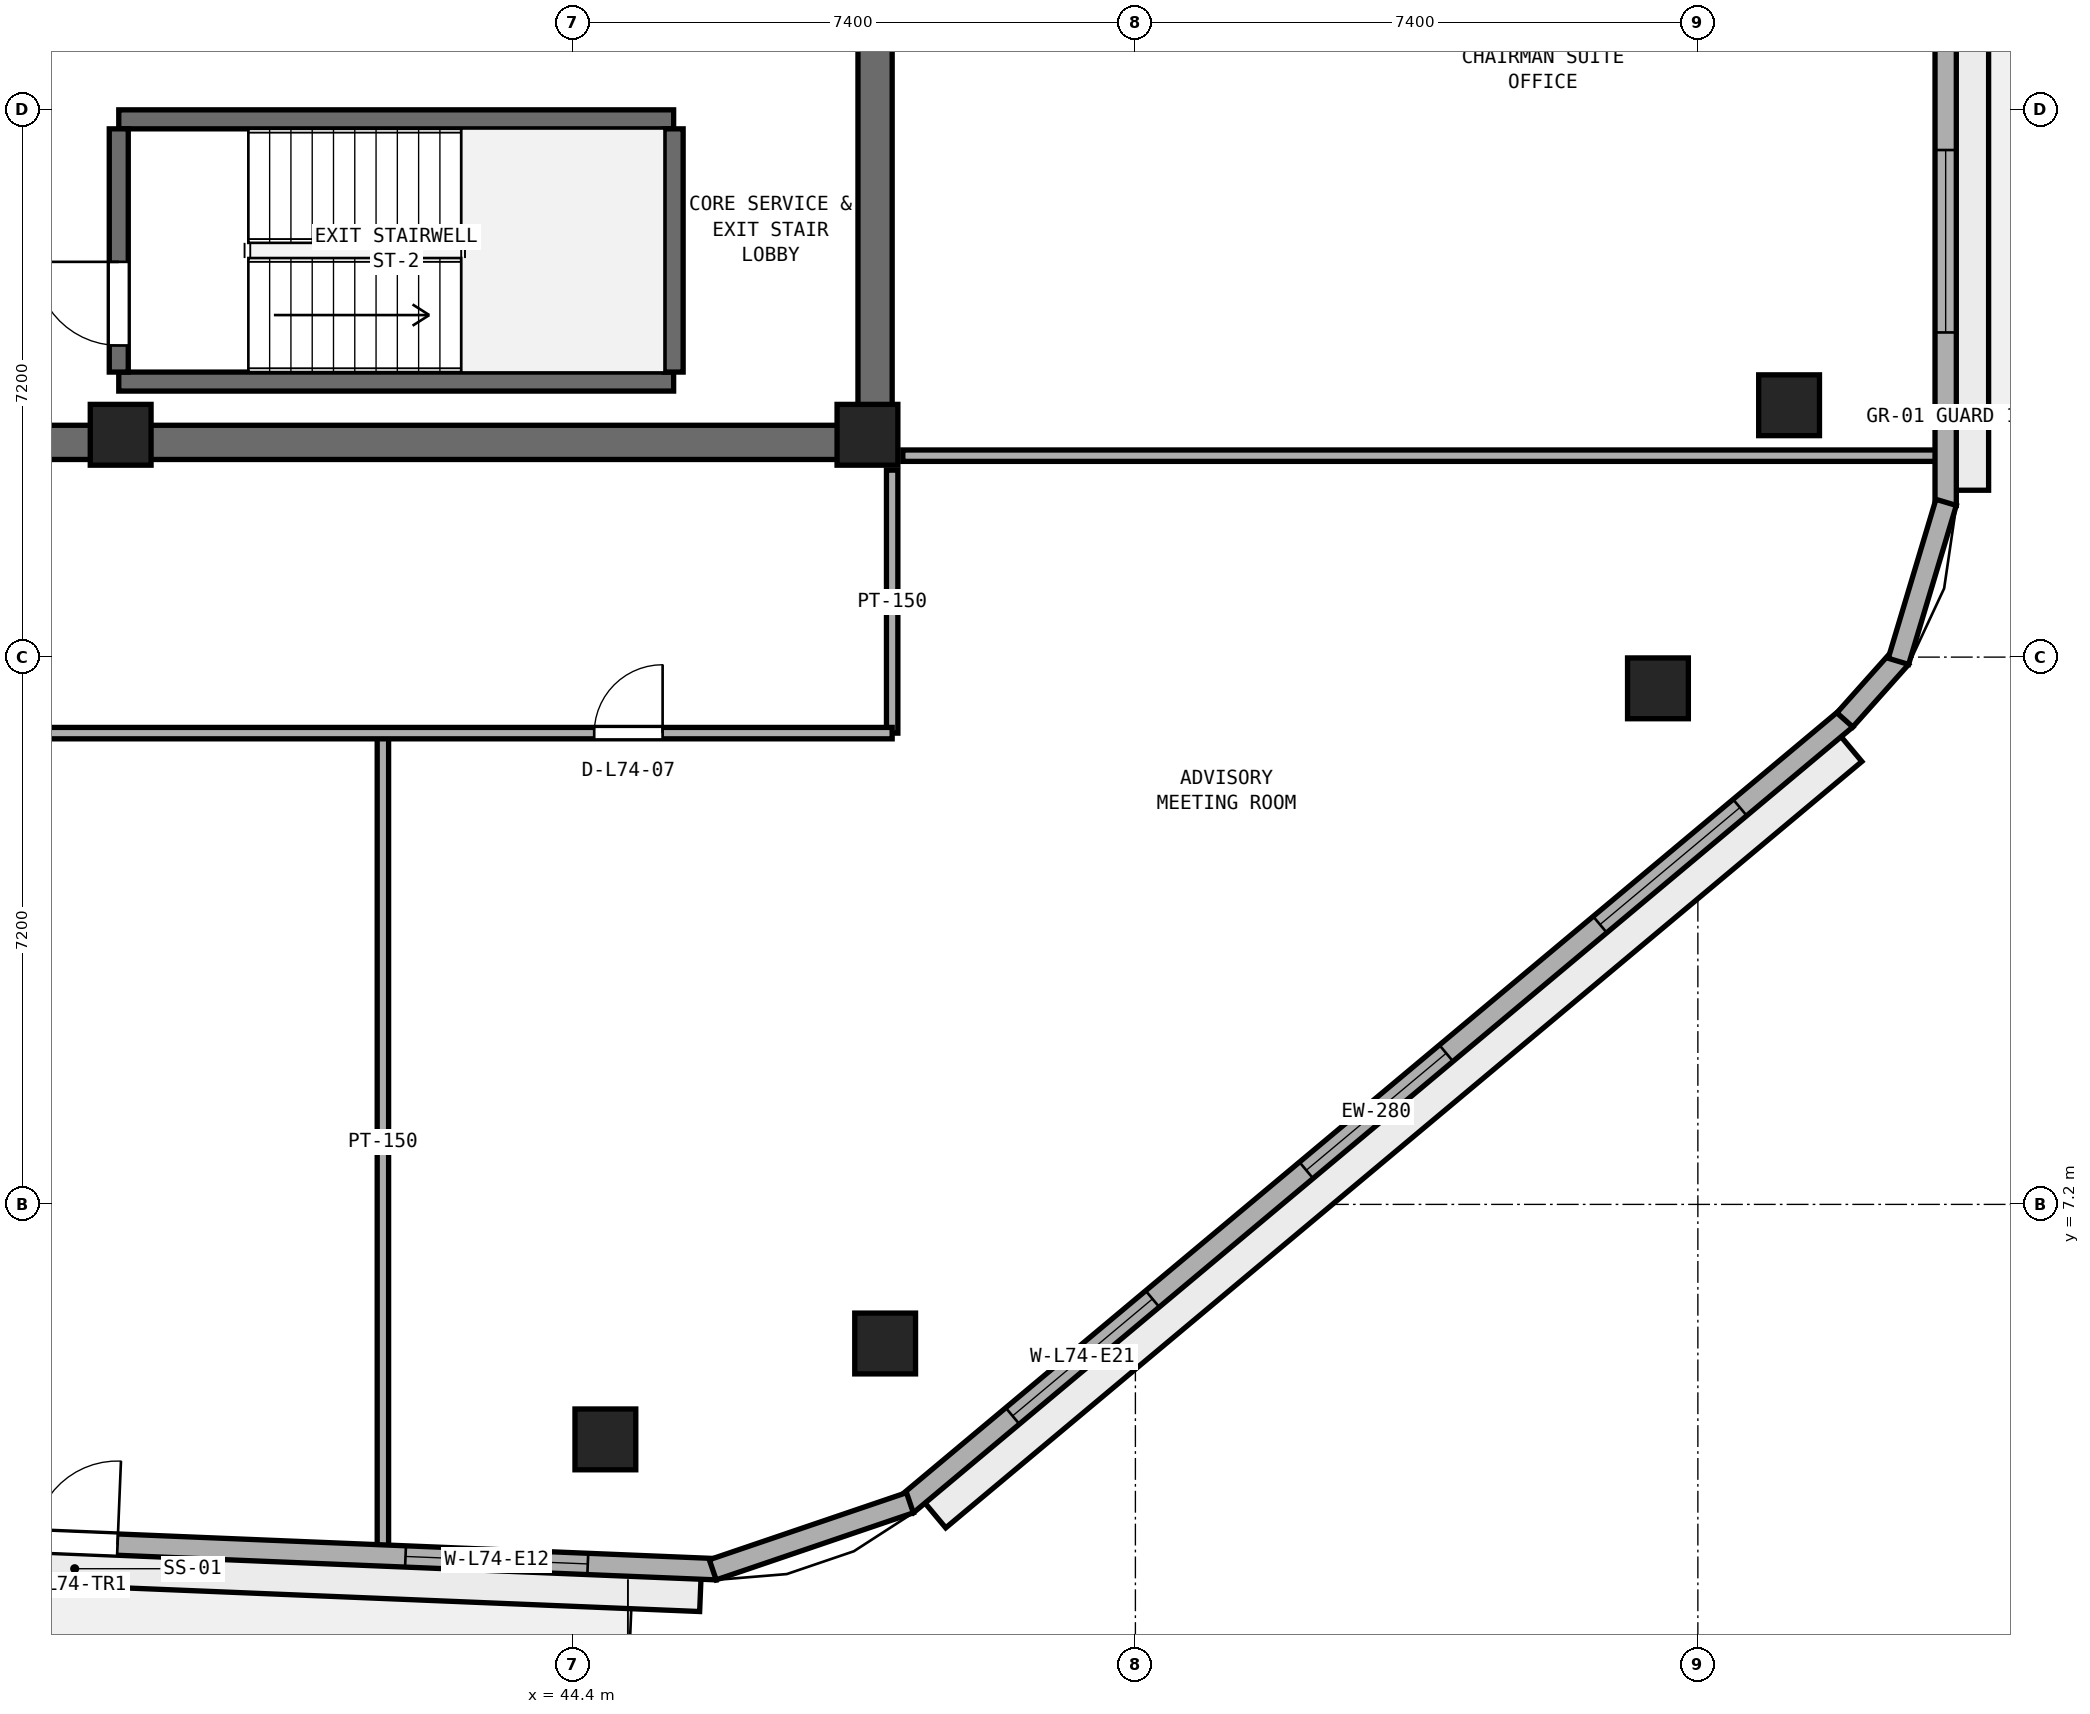
"""IFC4 building model, lengths in metres.
Left out: names, types, materials, properties, quantities, classifications, styles, units other than length and angle.
Written with IfcOpenShell. Run it as: python <this file> out.ifc"""

import sys

from ifc_helpers import new_model, si_unit, direction, frame, frame_2d, origin, origin_2d, place, context, subcontext, project, spatial, rectangle, extrude, element, fill, save


model = new_model("IFC4")
c1 = context("Model", 3, precision=1e-05, world=origin(), true_north=direction((0.0, 1.0)))
c2 = subcontext(c1, "Body", "Model", "MODEL_VIEW")
j1 = project(units=[si_unit("LENGTHUNIT", "METRE"), si_unit("PLANEANGLEUNIT", "RADIAN")], contexts=[c1])
p1 = place(None, origin())
s1 = spatial("IfcSite", under=j1, at=p1, CompositionType="ELEMENT")
p2 = place(p1, origin())
s2 = spatial("IfcBuilding", under=s1, at=p2, CompositionType="ELEMENT")
p3 = place(p2, frame((0.0, 0.0, 289.6)))
s3 = spatial("IfcBuildingStorey", under=s2, at=p3, CompositionType="ELEMENT", Elevation=289.6)
p4 = place(p3, frame((25.4, 17.225, 0.0), z_axis=(0.0, 0.0, 1.0), x_axis=(1.0, 0.0, 0.0)))
e1 = element("IfcWall", 1, at=p4, inside=s3, PredefinedType="SHEAR", context=c2, shape_type="SweptSolid", body=[
    extrude(rectangle(XDim=23.2, YDim=0.45, at=frame_2d((11.6, 0.0))), origin(), (0.0, 0.0, 1.0), 3.54),
])
p5 = place(p3, frame((48.375, 17.45, 0.0), z_axis=(0.0, 0.0, 1.0), x_axis=(0.0, 1.0, 0.0)))
e2 = element("IfcWall", 2, at=p5, inside=s3, PredefinedType="SHEAR", context=c2, shape_type="SweptSolid", body=[
    extrude(rectangle(XDim=15.5, YDim=0.45, at=frame_2d((7.75, 0.0))), origin(), (0.0, 0.0, 1.0), 3.54),
])
p6 = place(p5, frame((5.85, 0.0, 0.0)))
e3 = element("IfcOpeningElement", 3, at=p6, cuts=e2, PredefinedType="OPENING", context=c2, shape_type="SweptSolid", body=[
    extrude(rectangle(XDim=1.5, YDim=2.15, at=frame_2d((0.75, 1.075))), frame((0.0, 0.235, 0.0), z_axis=(0.0, -1.0, 0.0), x_axis=(1.0, 0.0, 0.0)), (0.0, 0.0, 1.0), 0.47),
])
for number, where, z_axis, x_axis in (
    (4, (38.45, 17.325, 0.0), (0.0, 0.0, 1.0), (1.0, 0.0, 0.0)),
    (5, (48.275, 17.325, 0.0), (0.0, 0.0, 1.0), (1.0, 0.0, 0.0)),
):
    element("IfcColumn", number, at=place(p3, frame(where, z_axis=z_axis, x_axis=x_axis)), inside=s3, PredefinedType="PILASTER", context=c2, shape_type="SweptSolid", body=[
        extrude(rectangle(XDim=0.8, YDim=0.8, at=origin_2d()), origin(), (0.0, 0.0, 1.0), 3.8),
    ])
for number, where, z_axis, x_axis in (
    (6, (44.827, 4.108, 0.0), (0.0, 0.0, 1.0), (1.0, 0.0, 0.0)),
    (7, (48.508, 5.37, 0.0), (0.0, 0.0, 1.0), (1.0, 0.0, 0.0)),
    (8, (58.675, 13.989, 0.0), (0.0, 0.0, 1.0), (1.0, 0.0, 0.0)),
    (9, (60.4, 17.714, 0.0), (0.0, 0.0, 1.0), (1.0, 0.0, 0.0)),
):
    element("IfcColumn", number, at=place(p3, frame(where, z_axis=z_axis, x_axis=x_axis)), inside=s3, PredefinedType="COLUMN", context=c2, shape_type="SweptSolid", body=[
        extrude(rectangle(XDim=0.8, YDim=0.8, at=origin_2d()), origin(), (0.0, 0.0, 1.0), 3.8),
    ])
for number, where, z_axis, x_axis in (
    (10, (38.425, 18.025, 0.0), (0.0, 0.0, 1.0), (1.0, 0.0, 0.0)),
    (11, (38.425, 21.475, 0.0), (0.0, 0.0, 1.0), (1.0, 0.0, 0.0)),
):
    element("IfcWall", number, at=place(p3, frame(where, z_axis=z_axis, x_axis=x_axis)), inside=s3, PredefinedType="SHEAR", context=c2, shape_type="SweptSolid", body=[
        extrude(rectangle(XDim=7.3, YDim=0.25, at=frame_2d((3.65, 0.0))), origin(), (0.0, 0.0, 1.0), 3.54),
    ])
p7 = place(p3, frame((38.425, 18.15, 0.0), z_axis=(0.0, 0.0, 1.0), x_axis=(0.0, 1.0, 0.0)))
e12 = element("IfcWall", 12, at=p7, inside=s3, PredefinedType="SHEAR", context=c2, shape_type="SweptSolid", body=[
    extrude(rectangle(XDim=3.2, YDim=0.25, at=frame_2d((1.6, 0.0))), origin(), (0.0, 0.0, 1.0), 3.54),
])
p8 = place(p7, frame((0.35, 0.0, 0.0)))
e13 = element("IfcOpeningElement", 13, at=p8, cuts=e12, PredefinedType="OPENING", context=c2, shape_type="SweptSolid", body=[
    extrude(rectangle(XDim=1.1, YDim=2.15, at=frame_2d((0.55, 1.075))), frame((0.0, 0.135, 0.0), z_axis=(0.0, -1.0, 0.0), x_axis=(1.0, 0.0, 0.0)), (0.0, 0.0, 1.0), 0.27),
])
p9 = place(p3, frame((45.725, 18.15, 0.0), z_axis=(0.0, 0.0, 1.0), x_axis=(0.0, 1.0, 0.0)))
e14 = element("IfcWall", 14, at=p9, inside=s3, PredefinedType="SHEAR", context=c2, shape_type="SweptSolid", body=[
    extrude(rectangle(XDim=3.2, YDim=0.25, at=frame_2d((1.6, 0.0))), origin(), (0.0, 0.0, 1.0), 3.54),
])
p10 = place(p3, frame((48.6, 13.4, 0.0), z_axis=(0.0, 0.0, 1.0), x_axis=(0.0, 1.0, 0.0)))
e15 = element("IfcWall", 15, at=p10, inside=s3, PredefinedType="PARTITIONING", context=c2, shape_type="SweptSolid", body=[
    extrude(rectangle(XDim=3.46, YDim=0.15, at=frame_2d((1.73, 0.0))), origin(), (0.0, 0.0, 1.0), 3.54),
])
p11 = place(p3, frame((41.9, 2.646, 0.0), z_axis=(0.0, 0.0, 1.0), x_axis=(0.0, 1.0, 0.0)))
e16 = element("IfcWall", 16, at=p11, inside=s3, PredefinedType="PARTITIONING", context=c2, shape_type="SweptSolid", body=[
    extrude(rectangle(XDim=10.754, YDim=0.15, at=frame_2d((5.377, 0.0))), origin(), (0.0, 0.0, 1.0), 3.54),
])
p12 = place(p3, frame((21.8, 13.4, 0.0), z_axis=(0.0, 0.0, 1.0), x_axis=(1.0, 0.0, 0.0)))
e17 = element("IfcWall", 17, at=p12, inside=s3, PredefinedType="PARTITIONING", context=c2, shape_type="SweptSolid", body=[
    extrude(rectangle(XDim=26.8, YDim=0.15, at=frame_2d((13.4, 0.0))), origin(), (0.0, 0.0, 1.0), 3.54),
])
p13 = place(p12, frame((3.92, 0.0, 0.0)))
e18 = element("IfcOpeningElement", 18, at=p13, cuts=e17, PredefinedType="OPENING", context=c2, shape_type="SweptSolid", body=[
    extrude(rectangle(XDim=1.0, YDim=2.12, at=frame_2d((0.5, 1.06))), frame((0.0, 0.085, 0.0), z_axis=(0.0, -1.0, 0.0), x_axis=(1.0, 0.0, 0.0)), (0.0, 0.0, 1.0), 0.17),
])
p14 = place(p12, frame((13.85, 0.0, 0.0)))
e19 = element("IfcOpeningElement", 19, at=p14, cuts=e17, PredefinedType="OPENING", context=c2, shape_type="SweptSolid", body=[
    extrude(rectangle(XDim=1.0, YDim=2.12, at=frame_2d((0.5, 1.06))), frame((0.0, 0.085, 0.0), z_axis=(0.0, -1.0, 0.0), x_axis=(1.0, 0.0, 0.0)), (0.0, 0.0, 1.0), 0.17),
])
p15 = place(p12, frame((22.88, 0.0, 0.0)))
e20 = element("IfcOpeningElement", 20, at=p15, cuts=e17, PredefinedType="OPENING", context=c2, shape_type="SweptSolid", body=[
    extrude(rectangle(XDim=0.9, YDim=2.1, at=frame_2d((0.45, 1.05))), frame((0.0, 0.085, 0.0), z_axis=(0.0, -1.0, 0.0), x_axis=(1.0, 0.0, 0.0)), (0.0, 0.0, 1.0), 0.17),
])
p16 = place(p3, frame((48.74, 17.05, 0.0), z_axis=(0.0, 0.0, 1.0), x_axis=(1.0, 0.0, 0.0)))
e21 = element("IfcWall", 21, at=p16, inside=s3, PredefinedType="PARTITIONING", context=c2, shape_type="SweptSolid", body=[
    extrude(rectangle(XDim=13.655, YDim=0.15, at=frame_2d((6.828, 0.0))), origin(), (0.0, 0.0, 1.0), 2.923),
])
p17 = place(p3, frame((29.428, 3.093, 0.0), z_axis=(0.0, 0.0, 1.0), x_axis=(0.999156257967, -0.041070331944, 0.0)))
e22 = element("IfcWall", 22, at=p17, inside=s3, PredefinedType="STANDARD", context=c2, shape_type="SweptSolid", body=[
    extrude(rectangle(XDim=16.876, YDim=0.28, at=frame_2d((8.438, 0.0))), origin(), (0.0, 0.0, 1.0), 3.54),
])
p18 = place(p17, frame((7.888, 0.0, 0.0)))
e23 = element("IfcOpeningElement", 23, at=p18, cuts=e22, PredefinedType="OPENING", context=c2, shape_type="SweptSolid", body=[
    extrude(rectangle(XDim=1.1, YDim=2.2, at=frame_2d((0.55, 1.1))), frame((0.0, 0.15, 0.0), z_axis=(0.0, -1.0, 0.0), x_axis=(1.0, 0.0, 0.0)), (0.0, 0.0, 1.0), 0.3),
])
p19 = place(p17, frame((1.946, 0.0, 0.9)))
e24 = element("IfcOpeningElement", 24, at=p19, cuts=e22, PredefinedType="OPENING", context=c2, shape_type="SweptSolid", body=[
    extrude(rectangle(XDim=2.4, YDim=1.75, at=frame_2d((1.2, 0.875))), frame((0.0, 0.15, 0.0), z_axis=(0.0, -1.0, 0.0), x_axis=(1.0, 0.0, 0.0)), (0.0, 0.0, 1.0), 0.3),
])
p20 = place(p17, frame((12.78, 0.0, 0.9)))
e25 = element("IfcOpeningElement", 25, at=p20, cuts=e22, PredefinedType="OPENING", context=c2, shape_type="SweptSolid", body=[
    extrude(rectangle(XDim=2.4, YDim=1.75, at=frame_2d((1.2, 0.875))), frame((0.0, 0.15, 0.0), z_axis=(0.0, -1.0, 0.0), x_axis=(1.0, 0.0, 0.0)), (0.0, 0.0, 1.0), 0.3),
])
p21 = place(p3, frame((48.789, 3.25, 0.0), z_axis=(0.0, 0.0, 1.0), x_axis=(0.767032672101, 0.641608042288, 0.0)))
e26 = element("IfcWall", 26, at=p21, inside=s3, PredefinedType="STANDARD", context=c2, shape_type="SweptSolid", body=[
    extrude(rectangle(XDim=16.113, YDim=0.28, at=frame_2d((8.057, 0.0))), origin(), (0.0, 0.0, 1.0), 3.54),
])
p22 = place(p21, frame((1.819, 0.0, 0.9)))
e27 = element("IfcOpeningElement", 27, at=p22, cuts=e26, PredefinedType="OPENING", context=c2, shape_type="SweptSolid", body=[
    extrude(rectangle(XDim=2.4, YDim=1.75, at=frame_2d((1.2, 0.875))), frame((0.0, 0.15, 0.0), z_axis=(0.0, -1.0, 0.0), x_axis=(1.0, 0.0, 0.0)), (0.0, 0.0, 1.0), 0.3),
])
p23 = place(p21, frame((6.857, 0.0, 0.9)))
e28 = element("IfcOpeningElement", 28, at=p23, cuts=e26, PredefinedType="OPENING", context=c2, shape_type="SweptSolid", body=[
    extrude(rectangle(XDim=2.4, YDim=1.75, at=frame_2d((1.2, 0.875))), frame((0.0, 0.15, 0.0), z_axis=(0.0, -1.0, 0.0), x_axis=(1.0, 0.0, 0.0)), (0.0, 0.0, 1.0), 0.3),
])
p24 = place(p21, frame((11.895, 0.0, 0.9)))
e29 = element("IfcOpeningElement", 29, at=p24, cuts=e26, PredefinedType="OPENING", context=c2, shape_type="SweptSolid", body=[
    extrude(rectangle(XDim=2.4, YDim=1.75, at=frame_2d((1.2, 0.875))), frame((0.0, 0.15, 0.0), z_axis=(0.0, -1.0, 0.0), x_axis=(1.0, 0.0, 0.0)), (0.0, 0.0, 1.0), 0.3),
])
p25 = place(p3, frame((62.46, 16.396, 0.0), z_axis=(0.0, 0.0, 1.0), x_axis=(0.0, 1.0, 0.0)))
e30 = element("IfcWall", 30, at=p25, inside=s3, PredefinedType="STANDARD", context=c2, shape_type="SweptSolid", body=[
    extrude(rectangle(XDim=18.854, YDim=0.28, at=frame_2d((9.427, 0.0))), origin(), (0.0, 0.0, 1.0), 3.54),
])
p26 = place(p25, frame((8.877, 0.0, 0.0)))
e31 = element("IfcOpeningElement", 31, at=p26, cuts=e30, PredefinedType="OPENING", context=c2, shape_type="SweptSolid", body=[
    extrude(rectangle(XDim=1.1, YDim=2.2, at=frame_2d((0.55, 1.1))), frame((0.0, 0.15, 0.0), z_axis=(0.0, -1.0, 0.0), x_axis=(1.0, 0.0, 0.0)), (0.0, 0.0, 1.0), 0.3),
])
p27 = place(p25, frame((2.276, 0.0, 0.9)))
e32 = element("IfcOpeningElement", 32, at=p27, cuts=e30, PredefinedType="OPENING", context=c2, shape_type="SweptSolid", body=[
    extrude(rectangle(XDim=2.4, YDim=1.75, at=frame_2d((1.2, 0.875))), frame((0.0, 0.15, 0.0), z_axis=(0.0, -1.0, 0.0), x_axis=(1.0, 0.0, 0.0)), (0.0, 0.0, 1.0), 0.3),
])
p28 = place(p25, frame((14.179, 0.0, 0.9)))
e33 = element("IfcOpeningElement", 33, at=p28, cuts=e30, PredefinedType="OPENING", context=c2, shape_type="SweptSolid", body=[
    extrude(rectangle(XDim=2.4, YDim=1.75, at=frame_2d((1.2, 0.875))), frame((0.0, 0.15, 0.0), z_axis=(0.0, -1.0, 0.0), x_axis=(1.0, 0.0, 0.0)), (0.0, 0.0, 1.0), 0.3),
])
p29 = place(p3, frame((46.24, 2.393, 0.0), z_axis=(0.0, 0.0, 1.0), x_axis=(0.946759165502, 0.321942669643, 0.0)))
e34 = element("IfcWall", 34, at=p29, inside=s3, PredefinedType="STANDARD", context=c2, shape_type="SweptSolid", body=[
    extrude(rectangle(XDim=2.74, YDim=0.28, at=frame_2d((1.37, 0.0))), origin(), (0.0, 0.0, 1.0), 3.54),
])
p30 = place(p3, frame((61.134, 13.574, 0.0), z_axis=(0.0, 0.0, 1.0), x_axis=(0.665804679247, 0.74612608123, 0.0)))
e35 = element("IfcWall", 35, at=p30, inside=s3, PredefinedType="STANDARD", context=c2, shape_type="SweptSolid", body=[
    extrude(rectangle(XDim=1.103, YDim=0.28, at=frame_2d((0.552, 0.0))), origin(), (0.0, 0.0, 1.0), 3.54),
])
p31 = place(p3, frame((61.839, 14.344, 0.0), z_axis=(0.0, 0.0, 1.0), x_axis=(0.287235049694, 0.957860128739, 0.0)))
e36 = element("IfcWall", 36, at=p31, inside=s3, PredefinedType="STANDARD", context=c2, shape_type="SweptSolid", body=[
    extrude(rectangle(XDim=2.184, YDim=0.28, at=frame_2d((1.092, 0.0))), origin(), (0.0, 0.0, 1.0), 3.54),
])
p32 = place(p8, origin())
e37 = element("IfcDoor", 37, at=p32, inside=s3, OperationType="SINGLE_SWING_RIGHT", PredefinedType="DOOR", context=c2, shape_type="SweptSolid", body=[
    extrude(rectangle(XDim=1.1, YDim=2.15, at=frame_2d((0.55, 1.075))), frame((0.0, 0.025, 0.0), z_axis=(0.0, -1.0, 0.0), x_axis=(1.0, 0.0, 0.0)), (0.0, 0.0, 1.0), 0.05),
])
fill(e13, e37)
p33 = place(p15, origin())
e38 = element("IfcDoor", 38, at=p33, inside=s3, OperationType="SINGLE_SWING_RIGHT", PredefinedType="DOOR", context=c2, shape_type="SweptSolid", body=[
    extrude(rectangle(XDim=0.9, YDim=2.1, at=frame_2d((0.45, 1.05))), frame((0.0, 0.025, 0.0), z_axis=(0.0, -1.0, 0.0), x_axis=(1.0, 0.0, 0.0)), (0.0, 0.0, 1.0), 0.05),
])
fill(e20, e38)
p34 = place(p18, origin())
e39 = element("IfcDoor", 39, at=p34, inside=s3, OperationType="SINGLE_SWING_RIGHT", PredefinedType="DOOR", context=c2, shape_type="SweptSolid", body=[
    extrude(rectangle(XDim=1.1, YDim=2.2, at=frame_2d((0.55, 1.1))), frame((0.0, 0.025, 0.0), z_axis=(0.0, -1.0, 0.0), x_axis=(1.0, 0.0, 0.0)), (0.0, 0.0, 1.0), 0.05),
])
fill(e23, e39)
p35 = place(p20, origin())
e40 = element("IfcWindow", 40, at=p35, inside=s3, PartitioningType="SINGLE_PANEL", PredefinedType="WINDOW", context=c2, shape_type="SweptSolid", body=[
    extrude(rectangle(XDim=2.4, YDim=1.75, at=frame_2d((1.2, 0.875))), frame((0.0, 0.03, 0.0), z_axis=(0.0, -1.0, 0.0), x_axis=(1.0, 0.0, 0.0)), (0.0, 0.0, 1.0), 0.06),
])
fill(e25, e40)
p36 = place(p22, origin())
e41 = element("IfcWindow", 41, at=p36, inside=s3, PartitioningType="SINGLE_PANEL", PredefinedType="WINDOW", context=c2, shape_type="SweptSolid", body=[
    extrude(rectangle(XDim=2.4, YDim=1.75, at=frame_2d((1.2, 0.875))), frame((0.0, 0.03, 0.0), z_axis=(0.0, -1.0, 0.0), x_axis=(1.0, 0.0, 0.0)), (0.0, 0.0, 1.0), 0.06),
])
fill(e27, e41)
p37 = place(p23, origin())
e42 = element("IfcWindow", 42, at=p37, inside=s3, PartitioningType="SINGLE_PANEL", PredefinedType="WINDOW", context=c2, shape_type="SweptSolid", body=[
    extrude(rectangle(XDim=2.4, YDim=1.75, at=frame_2d((1.2, 0.875))), frame((0.0, 0.03, 0.0), z_axis=(0.0, -1.0, 0.0), x_axis=(1.0, 0.0, 0.0)), (0.0, 0.0, 1.0), 0.06),
])
fill(e28, e42)
p38 = place(p24, origin())
e43 = element("IfcWindow", 43, at=p38, inside=s3, PartitioningType="SINGLE_PANEL", PredefinedType="WINDOW", context=c2, shape_type="SweptSolid", body=[
    extrude(rectangle(XDim=2.4, YDim=1.75, at=frame_2d((1.2, 0.875))), frame((0.0, 0.03, 0.0), z_axis=(0.0, -1.0, 0.0), x_axis=(1.0, 0.0, 0.0)), (0.0, 0.0, 1.0), 0.06),
])
fill(e29, e43)
p39 = place(p27, origin())
e44 = element("IfcWindow", 44, at=p39, inside=s3, PartitioningType="SINGLE_PANEL", PredefinedType="WINDOW", context=c2, shape_type="SweptSolid", body=[
    extrude(rectangle(XDim=2.4, YDim=1.75, at=frame_2d((1.2, 0.875))), frame((0.0, 0.03, 0.0), z_axis=(0.0, -1.0, 0.0), x_axis=(1.0, 0.0, 0.0)), (0.0, 0.0, 1.0), 0.06),
])
fill(e32, e44)
save(model, sys.argv[1])
